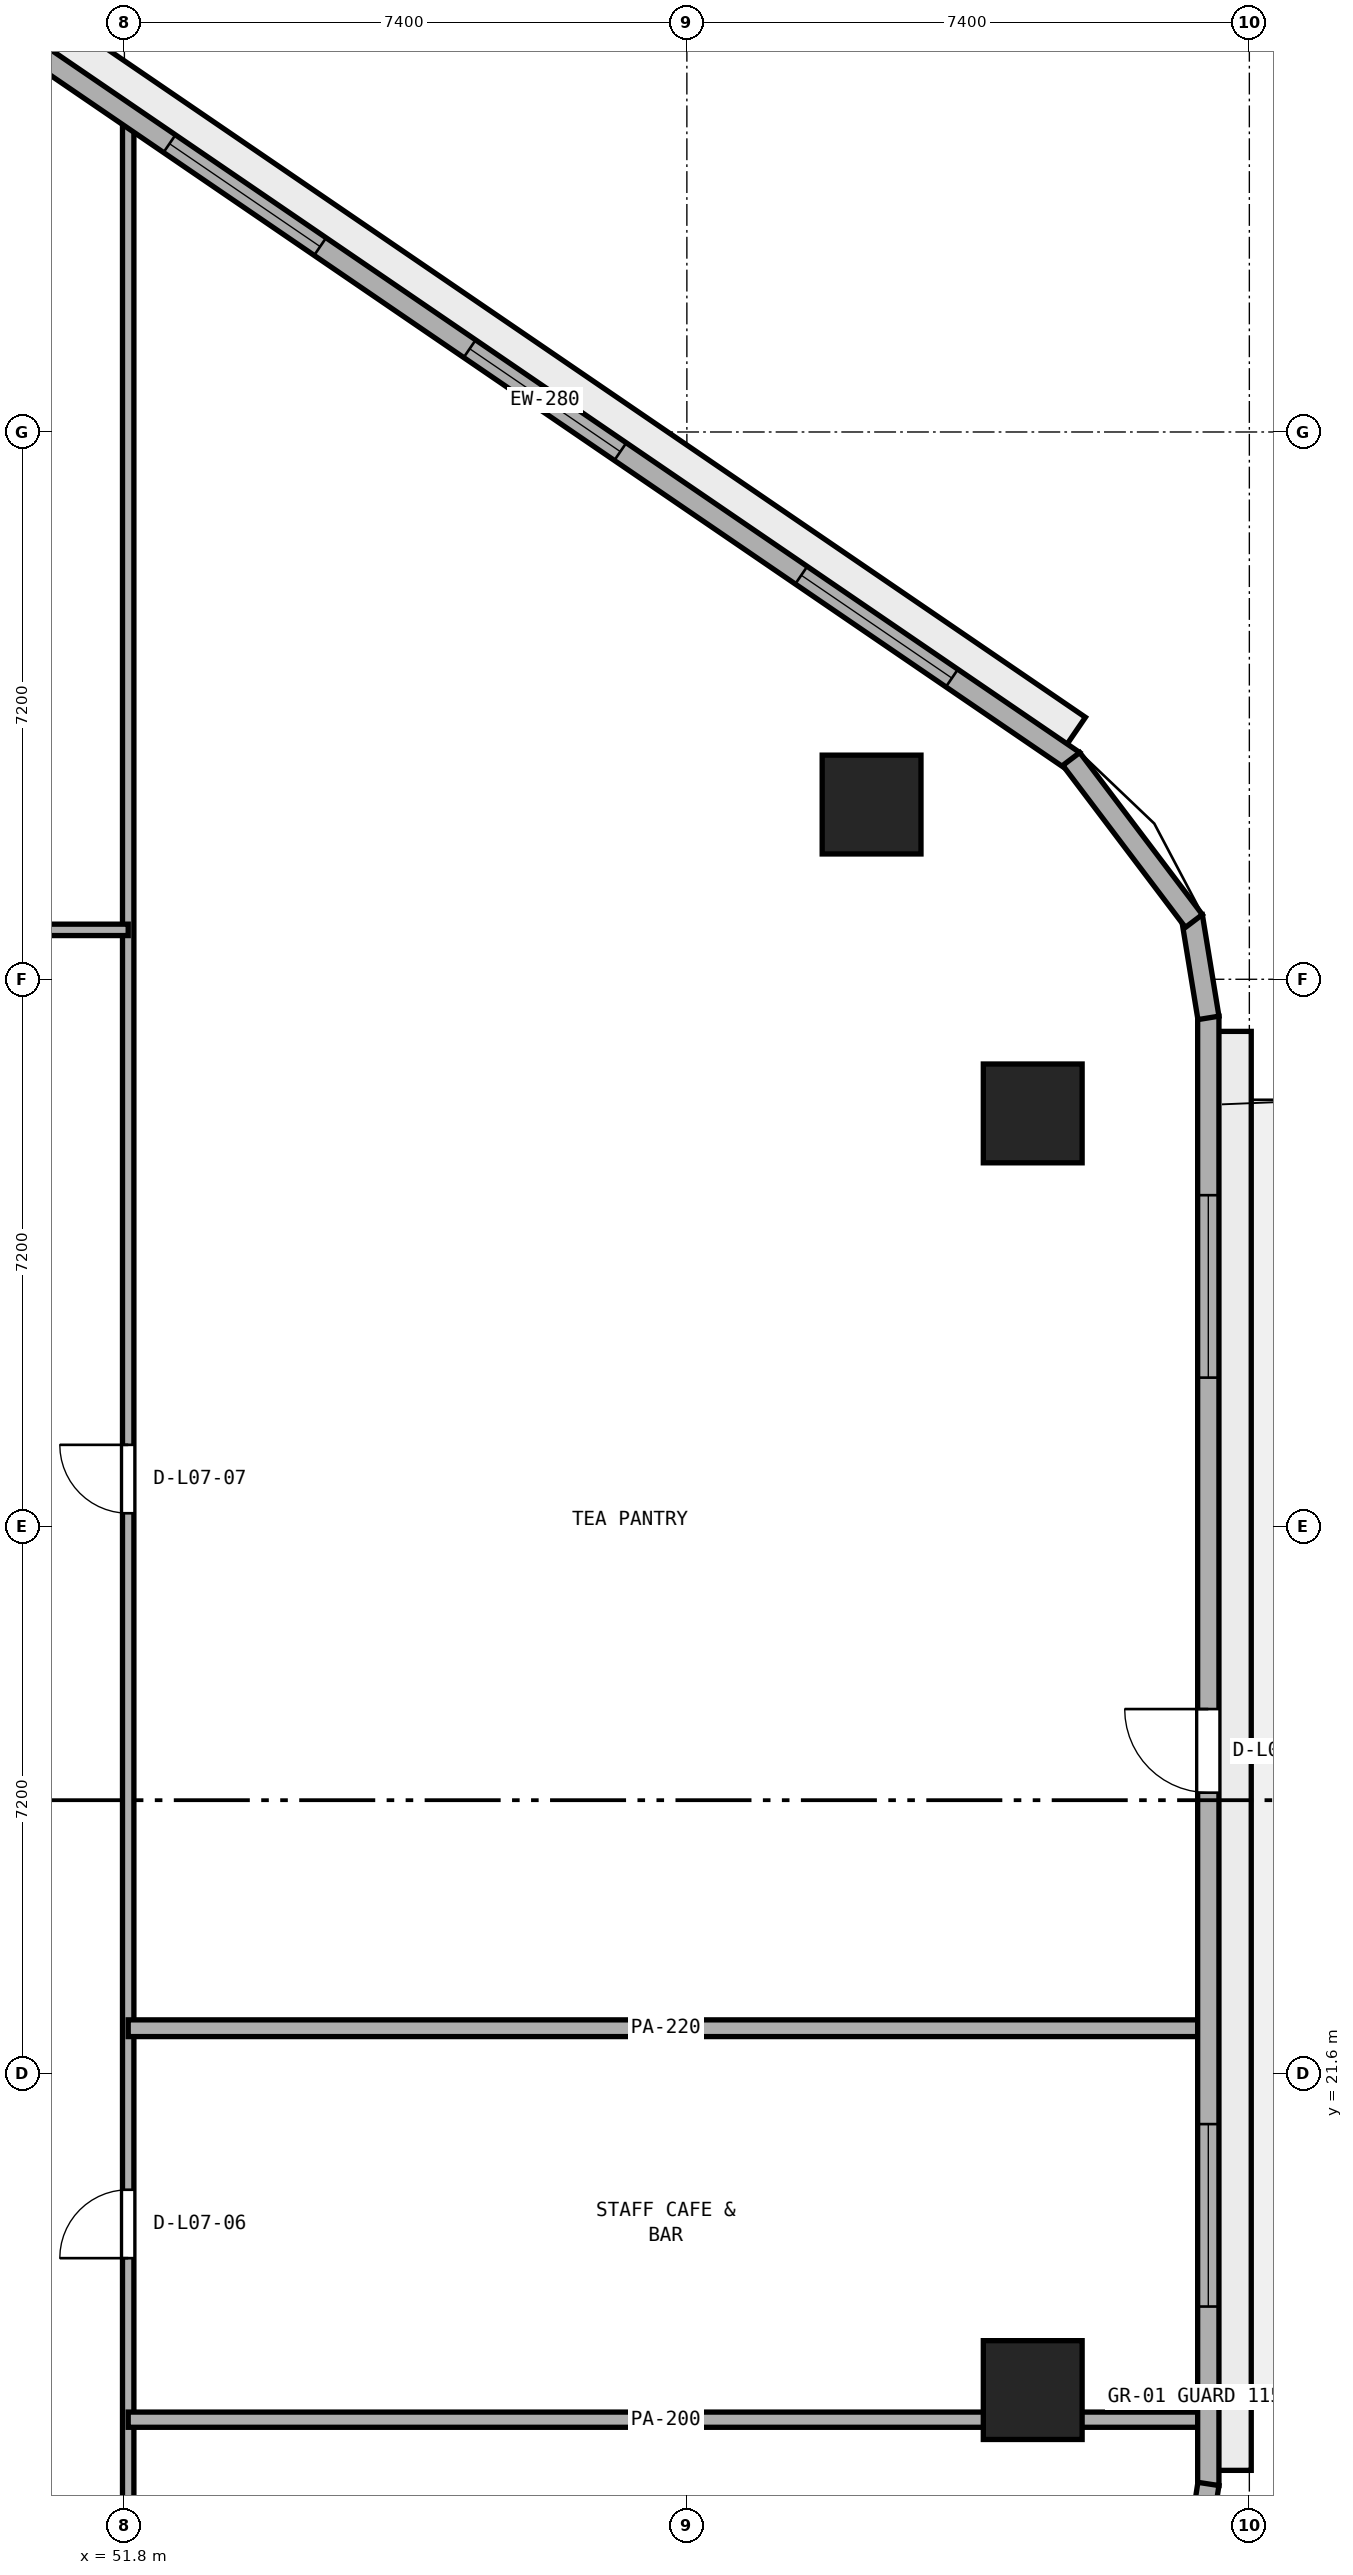
"""IFC4 building model, lengths in metres.
Left out: names, types, materials, properties, quantities, classifications, styles, units other than length and angle.
Written with IfcOpenShell. Run it as: python <this file> out.ifc"""

import sys

from ifc_helpers import new_model, si_unit, direction, frame, frame_2d, origin, origin_2d, place, context, subcontext, project, spatial, rectangle, extrude, element, fill, save


model = new_model("IFC4")
c1 = context("Model", 3, precision=1e-05, world=origin(), true_north=direction((0.0, 1.0)))
c2 = subcontext(c1, "Body", "Model", "MODEL_VIEW")
j1 = project(units=[si_unit("LENGTHUNIT", "METRE"), si_unit("PLANEANGLEUNIT", "RADIAN")], contexts=[c1])
p1 = place(None, origin())
s1 = spatial("IfcSite", under=j1, at=p1, CompositionType="ELEMENT")
p2 = place(p1, origin())
s2 = spatial("IfcBuilding", under=s1, at=p2, CompositionType="ELEMENT")
p3 = place(p2, frame((0.0, 0.0, 32.6)))
s3 = spatial("IfcBuildingStorey", under=s2, at=p3, CompositionType="ELEMENT", Elevation=32.6)
for number, where, z_axis, x_axis in (
    (1, (63.75, 17.44, 0.0), (0.0, 0.0, 1.0), (1.0, 0.0, 0.0)),
    (2, (63.75, 34.235, 0.0), (0.0, 0.0, 1.0), (1.0, 0.0, 0.0)),
    (3, (61.63, 38.299, 0.0), (0.0, 0.0, 1.0), (1.0, 0.0, 0.0)),
):
    element("IfcColumn", number, at=place(p3, frame(where, z_axis=z_axis, x_axis=x_axis)), inside=s3, PredefinedType="COLUMN", context=c2, shape_type="SweptSolid", body=[
        extrude(rectangle(XDim=1.3, YDim=1.3, at=origin_2d()), origin(), (0.0, 0.0, 1.0), 3.8),
    ])
p4 = place(p3, frame((51.85, 13.75, 0.0), z_axis=(0.0, 0.0, 1.0), x_axis=(0.0, 1.0, 0.0)))
e4 = element("IfcWall", 4, at=p4, inside=s3, PredefinedType="PARTITIONING", context=c2, shape_type="SweptSolid", body=[
    extrude(rectangle(XDim=33.644, YDim=0.15, at=frame_2d((16.822, 0.0))), origin(), (0.0, 0.0, 1.0), 3.525),
])
p5 = place(p4, frame((5.425, 0.0, 0.0)))
e5 = element("IfcOpeningElement", 5, at=p5, cuts=e4, PredefinedType="OPENING", context=c2, shape_type="SweptSolid", body=[
    extrude(rectangle(XDim=0.9, YDim=2.1, at=frame_2d((0.45, 1.05))), frame((0.0, 0.085, 0.0), z_axis=(0.0, -1.0, 0.0), x_axis=(1.0, 0.0, 0.0)), (0.0, 0.0, 1.0), 0.17),
])
p6 = place(p4, frame((15.225, 0.0, 0.0)))
e6 = element("IfcOpeningElement", 6, at=p6, cuts=e4, PredefinedType="OPENING", context=c2, shape_type="SweptSolid", body=[
    extrude(rectangle(XDim=0.9, YDim=2.1, at=frame_2d((0.45, 1.05))), frame((0.0, 0.085, 0.0), z_axis=(0.0, -1.0, 0.0), x_axis=(1.0, 0.0, 0.0)), (0.0, 0.0, 1.0), 0.17),
])
p7 = place(p3, frame((51.85, 17.05, 0.0), z_axis=(0.0, 0.0, 1.0), x_axis=(1.0, 0.0, 0.0)))
e7 = element("IfcWall", 7, at=p7, inside=s3, PredefinedType="PARTITIONING", context=c2, shape_type="SweptSolid", body=[
    extrude(rectangle(XDim=14.145, YDim=0.2, at=frame_2d((7.073, 0.0))), origin(), (0.0, 0.0, 1.0), 3.525),
])
p8 = place(p3, frame((51.85, 22.2, 0.0), z_axis=(0.0, 0.0, 1.0), x_axis=(1.0, 0.0, 0.0)))
e8 = element("IfcWall", 8, at=p8, inside=s3, PredefinedType="PARTITIONING", context=c2, shape_type="SweptSolid", body=[
    extrude(rectangle(XDim=14.145, YDim=0.22, at=frame_2d((7.073, 0.0))), origin(), (0.0, 0.0, 1.0), 3.525),
])
p9 = place(p3, frame((22.15, 36.65, 0.0), z_axis=(0.0, 0.0, 1.0), x_axis=(1.0, 0.0, 0.0)))
e9 = element("IfcWall", 9, at=p9, inside=s3, PredefinedType="PARTITIONING", context=c2, shape_type="SweptSolid", body=[
    extrude(rectangle(XDim=29.7, YDim=0.15, at=frame_2d((14.85, 0.0))), origin(), (0.0, 0.0, 1.0), 3.525),
])
p10 = place(p9, frame((4.145, 0.0, 0.0)))
e10 = element("IfcOpeningElement", 10, at=p10, cuts=e9, PredefinedType="OPENING", context=c2, shape_type="SweptSolid", body=[
    extrude(rectangle(XDim=1.0, YDim=2.12, at=frame_2d((0.5, 1.06))), frame((0.0, 0.085, 0.0), z_axis=(0.0, -1.0, 0.0), x_axis=(1.0, 0.0, 0.0)), (0.0, 0.0, 1.0), 0.17),
])
p11 = place(p9, frame((18.755, 0.0, 0.0)))
e11 = element("IfcOpeningElement", 11, at=p11, cuts=e9, PredefinedType="OPENING", context=c2, shape_type="SweptSolid", body=[
    extrude(rectangle(XDim=1.0, YDim=2.12, at=frame_2d((0.5, 1.06))), frame((0.0, 0.085, 0.0), z_axis=(0.0, -1.0, 0.0), x_axis=(1.0, 0.0, 0.0)), (0.0, 0.0, 1.0), 0.17),
])
p12 = place(p3, frame((66.06, 16.183, 0.0), z_axis=(0.0, 0.0, 1.0), x_axis=(0.0, 1.0, 0.0)))
e12 = element("IfcWall", 12, at=p12, inside=s3, PredefinedType="STANDARD", context=c2, shape_type="SweptSolid", body=[
    extrude(rectangle(XDim=19.331, YDim=0.28, at=frame_2d((9.666, 0.0))), origin(), (0.0, 0.0, 1.0), 3.525),
])
p13 = place(p12, frame((9.115, 0.0, 0.0)))
e13 = element("IfcOpeningElement", 13, at=p13, cuts=e12, PredefinedType="OPENING", context=c2, shape_type="SweptSolid", body=[
    extrude(rectangle(XDim=1.1, YDim=2.2, at=frame_2d((0.55, 1.1))), frame((0.0, 0.15, 0.0), z_axis=(0.0, -1.0, 0.0), x_axis=(1.0, 0.0, 0.0)), (0.0, 0.0, 1.0), 0.3),
])
p14 = place(p12, frame((2.355, 0.0, 0.9)))
e14 = element("IfcOpeningElement", 14, at=p14, cuts=e12, PredefinedType="OPENING", context=c2, shape_type="SweptSolid", body=[
    extrude(rectangle(XDim=2.4, YDim=1.75, at=frame_2d((1.2, 0.875))), frame((0.0, 0.15, 0.0), z_axis=(0.0, -1.0, 0.0), x_axis=(1.0, 0.0, 0.0)), (0.0, 0.0, 1.0), 0.3),
])
p15 = place(p12, frame((14.576, 0.0, 0.9)))
e15 = element("IfcOpeningElement", 15, at=p15, cuts=e12, PredefinedType="OPENING", context=c2, shape_type="SweptSolid", body=[
    extrude(rectangle(XDim=2.4, YDim=1.75, at=frame_2d((1.2, 0.875))), frame((0.0, 0.15, 0.0), z_axis=(0.0, -1.0, 0.0), x_axis=(1.0, 0.0, 0.0)), (0.0, 0.0, 1.0), 0.3),
])
p16 = place(p3, frame((64.29, 38.867, 0.0), z_axis=(0.0, 0.0, 1.0), x_axis=(-0.825755550159, 0.564028165416, 0.0)))
e16 = element("IfcWall", 16, at=p16, inside=s3, PredefinedType="STANDARD", context=c2, shape_type="SweptSolid", body=[
    extrude(rectangle(XDim=16.848, YDim=0.28, at=frame_2d((8.424, 0.0))), origin(), (0.0, 0.0, 1.0), 3.525),
])
p17 = place(p16, frame((1.941, 0.0, 0.9)))
e17 = element("IfcOpeningElement", 17, at=p17, cuts=e16, PredefinedType="OPENING", context=c2, shape_type="SweptSolid", body=[
    extrude(rectangle(XDim=2.4, YDim=1.75, at=frame_2d((1.2, 0.875))), frame((0.0, 0.15, 0.0), z_axis=(0.0, -1.0, 0.0), x_axis=(1.0, 0.0, 0.0)), (0.0, 0.0, 1.0), 0.3),
])
p18 = place(p16, frame((7.224, 0.0, 0.9)))
e18 = element("IfcOpeningElement", 18, at=p18, cuts=e16, PredefinedType="OPENING", context=c2, shape_type="SweptSolid", body=[
    extrude(rectangle(XDim=2.4, YDim=1.75, at=frame_2d((1.2, 0.875))), frame((0.0, 0.15, 0.0), z_axis=(0.0, -1.0, 0.0), x_axis=(1.0, 0.0, 0.0)), (0.0, 0.0, 1.0), 0.3),
])
p19 = place(p16, frame((12.007, 0.0, 0.9)))
e19 = element("IfcOpeningElement", 19, at=p19, cuts=e16, PredefinedType="OPENING", context=c2, shape_type="SweptSolid", body=[
    extrude(rectangle(XDim=2.4, YDim=1.75, at=frame_2d((1.2, 0.875))), frame((0.0, 0.15, 0.0), z_axis=(0.0, -1.0, 0.0), x_axis=(1.0, 0.0, 0.0)), (0.0, 0.0, 1.0), 0.3),
])
p20 = place(p3, frame((65.867, 14.943, 0.0), z_axis=(0.0, 0.0, 1.0), x_axis=(0.152014078361, 0.988378328364, 0.0)))
e20 = element("IfcWall", 20, at=p20, inside=s3, PredefinedType="STANDARD", context=c2, shape_type="SweptSolid", body=[
    extrude(rectangle(XDim=1.277, YDim=0.28, at=frame_2d((0.638, 0.0))), origin(), (0.0, 0.0, 1.0), 3.525),
])
p21 = place(p3, frame((66.062, 35.492, 0.0), z_axis=(0.0, 0.0, 1.0), x_axis=(-0.161182073582, 0.986924687682, 0.0)))
e21 = element("IfcWall", 21, at=p21, inside=s3, PredefinedType="STANDARD", context=c2, shape_type="SweptSolid", body=[
    extrude(rectangle(XDim=1.354, YDim=0.28, at=frame_2d((0.677, 0.0))), origin(), (0.0, 0.0, 1.0), 3.525),
])
p22 = place(p3, frame((65.87, 36.767, 0.0), z_axis=(0.0, 0.0, 1.0), x_axis=(-0.603370463754, 0.797461023166, 0.0)))
e22 = element("IfcWall", 22, at=p22, inside=s3, PredefinedType="STANDARD", context=c2, shape_type="SweptSolid", body=[
    extrude(rectangle(XDim=2.673, YDim=0.28, at=frame_2d((1.336, 0.0))), origin(), (0.0, 0.0, 1.0), 3.525),
])
p23 = place(p5, origin())
e23 = element("IfcDoor", 23, at=p23, inside=s3, OperationType="SINGLE_SWING_LEFT", PredefinedType="DOOR", context=c2, shape_type="SweptSolid", body=[
    extrude(rectangle(XDim=0.9, YDim=2.1, at=frame_2d((0.45, 1.05))), frame((0.0, 0.025, 0.0), z_axis=(0.0, -1.0, 0.0), x_axis=(1.0, 0.0, 0.0)), (0.0, 0.0, 1.0), 0.05),
])
fill(e5, e23)
p24 = place(p6, origin())
e24 = element("IfcDoor", 24, at=p24, inside=s3, OperationType="SINGLE_SWING_RIGHT", PredefinedType="DOOR", context=c2, shape_type="SweptSolid", body=[
    extrude(rectangle(XDim=0.9, YDim=2.1, at=frame_2d((0.45, 1.05))), frame((0.0, 0.025, 0.0), z_axis=(0.0, -1.0, 0.0), x_axis=(1.0, 0.0, 0.0)), (0.0, 0.0, 1.0), 0.05),
])
fill(e6, e24)
p25 = place(p13, origin())
e25 = element("IfcDoor", 25, at=p25, inside=s3, OperationType="SINGLE_SWING_RIGHT", PredefinedType="DOOR", context=c2, shape_type="SweptSolid", body=[
    extrude(rectangle(XDim=1.1, YDim=2.2, at=frame_2d((0.55, 1.1))), frame((0.0, 0.025, 0.0), z_axis=(0.0, -1.0, 0.0), x_axis=(1.0, 0.0, 0.0)), (0.0, 0.0, 1.0), 0.05),
])
fill(e13, e25)
p26 = place(p14, origin())
e26 = element("IfcWindow", 26, at=p26, inside=s3, PartitioningType="SINGLE_PANEL", PredefinedType="WINDOW", context=c2, shape_type="SweptSolid", body=[
    extrude(rectangle(XDim=2.4, YDim=1.75, at=frame_2d((1.2, 0.875))), frame((0.0, 0.03, 0.0), z_axis=(0.0, -1.0, 0.0), x_axis=(1.0, 0.0, 0.0)), (0.0, 0.0, 1.0), 0.06),
])
fill(e14, e26)
p27 = place(p15, origin())
e27 = element("IfcWindow", 27, at=p27, inside=s3, PartitioningType="SINGLE_PANEL", PredefinedType="WINDOW", context=c2, shape_type="SweptSolid", body=[
    extrude(rectangle(XDim=2.4, YDim=1.75, at=frame_2d((1.2, 0.875))), frame((0.0, 0.03, 0.0), z_axis=(0.0, -1.0, 0.0), x_axis=(1.0, 0.0, 0.0)), (0.0, 0.0, 1.0), 0.06),
])
fill(e15, e27)
p28 = place(p17, origin())
e28 = element("IfcWindow", 28, at=p28, inside=s3, PartitioningType="SINGLE_PANEL", PredefinedType="WINDOW", context=c2, shape_type="SweptSolid", body=[
    extrude(rectangle(XDim=2.4, YDim=1.75, at=frame_2d((1.2, 0.875))), frame((0.0, 0.03, 0.0), z_axis=(0.0, -1.0, 0.0), x_axis=(1.0, 0.0, 0.0)), (0.0, 0.0, 1.0), 0.06),
])
fill(e17, e28)
p29 = place(p18, origin())
e29 = element("IfcWindow", 29, at=p29, inside=s3, PartitioningType="SINGLE_PANEL", PredefinedType="WINDOW", context=c2, shape_type="SweptSolid", body=[
    extrude(rectangle(XDim=2.4, YDim=1.75, at=frame_2d((1.2, 0.875))), frame((0.0, 0.03, 0.0), z_axis=(0.0, -1.0, 0.0), x_axis=(1.0, 0.0, 0.0)), (0.0, 0.0, 1.0), 0.06),
])
fill(e18, e29)
p30 = place(p19, origin())
e30 = element("IfcWindow", 30, at=p30, inside=s3, PartitioningType="SINGLE_PANEL", PredefinedType="WINDOW", context=c2, shape_type="SweptSolid", body=[
    extrude(rectangle(XDim=2.4, YDim=1.75, at=frame_2d((1.2, 0.875))), frame((0.0, 0.03, 0.0), z_axis=(0.0, -1.0, 0.0), x_axis=(1.0, 0.0, 0.0)), (0.0, 0.0, 1.0), 0.06),
])
fill(e19, e30)
save(model, sys.argv[1])
